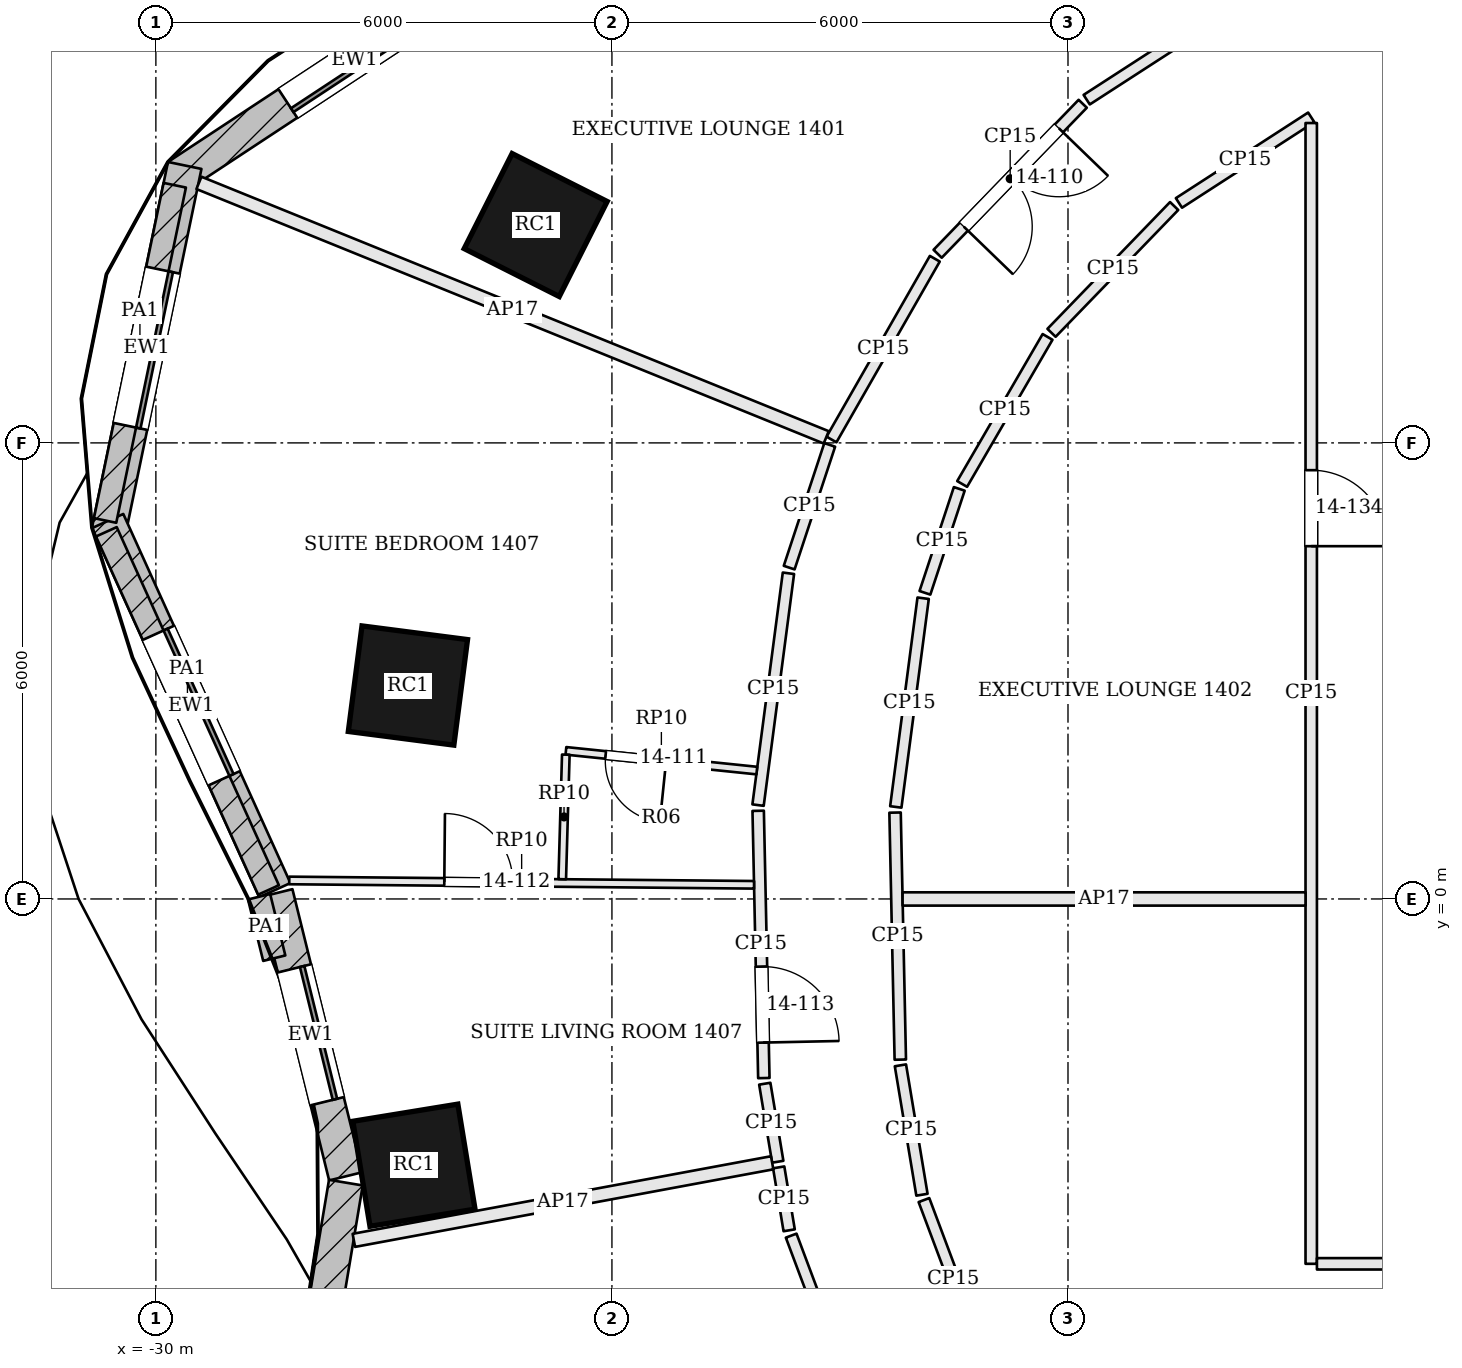
"""IFC4 building model, lengths in metres.
Left out: names, types, materials, properties, quantities, classifications, styles, units other than length and angle.
Written with IfcOpenShell. Run it as: python <this file> out.ifc"""

import sys

from ifc_helpers import new_model, si_unit, direction, frame, frame_2d, origin, origin_2d, place, context, subcontext, project, spatial, rectangle, extrude, element, fill, save


model = new_model("IFC4")
c1 = context("Model", 3, precision=1e-05, world=origin(), true_north=direction((0.0, 1.0)))
c2 = subcontext(c1, "Body", "Model", "MODEL_VIEW")
j1 = project(units=[si_unit("LENGTHUNIT", "METRE"), si_unit("PLANEANGLEUNIT", "RADIAN")], contexts=[c1])
p1 = place(None, origin())
s1 = spatial("IfcSite", under=j1, at=p1, CompositionType="ELEMENT")
p2 = place(p1, origin())
s2 = spatial("IfcBuilding", under=s1, at=p2, CompositionType="ELEMENT")
p3 = place(p2, frame((0.0, 0.0, 66.3)))
s3 = spatial("IfcBuildingStorey", under=s2, at=p3, CompositionType="ELEMENT", Elevation=66.3)
for number, where, z_axis, x_axis in (
    (1, (-25.003, 8.866, 0.0), (0.0, 0.0, 1.0), (-0.45, -0.893, 0.0)),
    (2, (-26.684, 2.808, 0.0), (0.0, 0.0, 1.0), (-0.128, -0.992, 0.0)),
    (3, (-26.605, -3.503, 0.0), (0.0, 0.0, 1.0), (0.161, -0.987, 0.0)),
):
    element("IfcColumn", number, at=place(p3, frame(where, z_axis=z_axis, x_axis=x_axis)), inside=s3, PredefinedType="COLUMN", context=c2, shape_type="SweptSolid", body=[
        extrude(rectangle(XDim=1.4, YDim=1.4, at=origin_2d()), origin(), (0.0, 0.0, 1.0), 3.6),
    ])
p4 = place(p3, frame((-25.061, 12.574, 0.0), z_axis=(0.0, 0.0, 1.0), x_axis=(-0.83520622102, -0.549936876714, 0.0)))
e4 = element("IfcWall", 4, at=p4, inside=s3, PredefinedType="SOLIDWALL", context=c2, shape_type="SweptSolid", body=[
    extrude(rectangle(XDim=5.57, YDim=0.45, at=frame_2d((2.785, 0.0))), origin(), (0.0, 0.0, 1.0), 3.4),
])
p5 = place(p4, frame((1.735, 0.0, 0.9)))
e5 = element("IfcOpeningElement", 5, at=p5, cuts=e4, PredefinedType="OPENING", context=c2, shape_type="SweptSolid", body=[
    extrude(rectangle(XDim=2.1, YDim=2.0, at=frame_2d((1.05, 1.0))), frame((0.0, 0.235, 0.0), z_axis=(0.0, -1.0, 0.0), x_axis=(1.0, 0.0, 0.0)), (0.0, 0.0, 1.0), 0.47),
])
p6 = place(p3, frame((-29.621, 9.65, 0.0), z_axis=(0.0, 0.0, 1.0), x_axis=(-0.203505836306, -0.979073732969, 0.0)))
e6 = element("IfcWall", 6, at=p6, inside=s3, PredefinedType="SOLIDWALL", context=c2, shape_type="SweptSolid", body=[
    extrude(rectangle(XDim=4.914, YDim=0.45, at=frame_2d((2.457, 0.0))), origin(), (0.0, 0.0, 1.0), 3.4),
])
p7 = place(p6, frame((1.407, 0.0, 0.9)))
e7 = element("IfcOpeningElement", 7, at=p7, cuts=e6, PredefinedType="OPENING", context=c2, shape_type="SweptSolid", body=[
    extrude(rectangle(XDim=2.1, YDim=2.0, at=frame_2d((1.05, 1.0))), frame((0.0, 0.235, 0.0), z_axis=(0.0, -1.0, 0.0), x_axis=(1.0, 0.0, 0.0)), (0.0, 0.0, 1.0), 0.47),
])
p8 = place(p3, frame((-30.634, 4.972, 0.0), z_axis=(0.0, 0.0, 1.0), x_axis=(0.412494644758, -0.910960025493, 0.0)))
e8 = element("IfcWall", 8, at=p8, inside=s3, PredefinedType="SOLIDWALL", context=c2, shape_type="SweptSolid", body=[
    extrude(rectangle(XDim=5.33, YDim=0.45, at=frame_2d((2.665, 0.0))), origin(), (0.0, 0.0, 1.0), 3.4),
])
p9 = place(p8, frame((1.615, 0.0, 0.9)))
e9 = element("IfcOpeningElement", 9, at=p9, cuts=e8, PredefinedType="OPENING", context=c2, shape_type="SweptSolid", body=[
    extrude(rectangle(XDim=2.1, YDim=2.0, at=frame_2d((1.05, 1.0))), frame((0.0, 0.235, 0.0), z_axis=(0.0, -1.0, 0.0), x_axis=(1.0, 0.0, 0.0)), (0.0, 0.0, 1.0), 0.47),
])
p10 = place(p3, frame((-28.422, 0.075, 0.0), z_axis=(0.0, 0.0, 1.0), x_axis=(0.239809222807, -0.970820033094, 0.0)))
e10 = element("IfcWall", 10, at=p10, inside=s3, PredefinedType="SOLIDWALL", context=c2, shape_type="SweptSolid", body=[
    extrude(rectangle(XDim=3.836, YDim=0.45, at=frame_2d((1.918, 0.0))), origin(), (0.0, 0.0, 1.0), 3.4),
])
p11 = place(p10, frame((1.018, 0.0, 0.9)))
e11 = element("IfcOpeningElement", 11, at=p11, cuts=e10, PredefinedType="OPENING", context=c2, shape_type="SweptSolid", body=[
    extrude(rectangle(XDim=1.8, YDim=2.0, at=frame_2d((0.9, 1.0))), frame((0.0, 0.235, 0.0), z_axis=(0.0, -1.0, 0.0), x_axis=(1.0, 0.0, 0.0)), (0.0, 0.0, 1.0), 0.47),
])
p12 = place(p3, frame((-27.5, -3.732, 0.0), z_axis=(0.0, 0.0, 1.0), x_axis=(-0.165174419367, -0.986264371853, 0.0)))
e12 = element("IfcWall", 12, at=p12, inside=s3, PredefinedType="SOLIDWALL", context=c2, shape_type="SweptSolid", body=[
    extrude(rectangle(XDim=5.769, YDim=0.45, at=frame_2d((2.885, 0.0))), origin(), (0.0, 0.0, 1.0), 3.4),
])
p13 = place(p12, frame((1.834, 0.0, 0.9)))
e13 = element("IfcOpeningElement", 13, at=p13, cuts=e12, PredefinedType="OPENING", context=c2, shape_type="SweptSolid", body=[
    extrude(rectangle(XDim=2.1, YDim=2.0, at=frame_2d((1.05, 1.0))), frame((0.0, 0.235, 0.0), z_axis=(0.0, -1.0, 0.0), x_axis=(1.0, 0.0, 0.0)), (0.0, 0.0, 1.0), 0.47),
])
p14 = place(p3, frame((-29.751, 9.39, 3.6), z_axis=(0.0, 0.0, 1.0), x_axis=(-0.203510555438, -0.97907275206, 0.0)))
e14 = element("IfcWall", 14, at=p14, inside=s3, PredefinedType="PARAPET", context=c2, shape_type="SweptSolid", body=[
    extrude(rectangle(XDim=4.505, YDim=0.3, at=frame_2d((2.252, 0.0))), origin(), (0.0, 0.0, 1.0), 1.1),
])
p15 = place(p3, frame((-30.652, 4.83, 3.6), z_axis=(0.0, 0.0, 1.0), x_axis=(0.412522333553, -0.910947487136, 0.0)))
e15 = element("IfcWall", 15, at=p15, inside=s3, PredefinedType="PARAPET", context=c2, shape_type="SweptSolid", body=[
    extrude(rectangle(XDim=5.173, YDim=0.3, at=frame_2d((2.586, 0.0))), origin(), (0.0, 0.0, 1.0), 1.1),
])
p16 = place(p3, frame((-28.642, 0.029, 3.6), z_axis=(0.0, 0.0, 1.0), x_axis=(0.239775825721, -0.970828282138, 0.0)))
e16 = element("IfcWall", 16, at=p16, inside=s3, PredefinedType="PARAPET", context=c2, shape_type="SweptSolid", body=[
    extrude(rectangle(XDim=0.833, YDim=0.3, at=frame_2d((0.417, 0.0))), origin(), (0.0, 0.0, 1.0), 1.1),
])
p17 = place(p3, frame((-15.166, 12.19, 0.0), z_axis=(0.0, 0.0, 1.0), x_axis=(-0.839538287855, -0.54330052754, 0.0)))
e17 = element("IfcWall", 17, at=p17, inside=s3, PredefinedType="PARTITIONING", context=c2, shape_type="SweptSolid", body=[
    extrude(rectangle(XDim=3.083, YDim=0.15, at=frame_2d((1.542, 0.0))), origin(), (0.0, 0.0, 1.0), 2.68),
])
p18 = place(p3, frame((-17.806, 10.462, 0.0), z_axis=(0.0, 0.0, 1.0), x_axis=(-0.695227375123, -0.71878988368, 0.0)))
e18 = element("IfcWall", 18, at=p18, inside=s3, PredefinedType="PARTITIONING", context=c2, shape_type="SweptSolid", body=[
    extrude(rectangle(XDim=2.746, YDim=0.15, at=frame_2d((1.373, 0.0))), origin(), (0.0, 0.0, 1.0), 2.68),
])
p19 = place(p18, frame((0.45, 0.0, 0.0)))
e19 = element("IfcOpeningElement", 19, at=p19, cuts=e18, PredefinedType="OPENING", context=c2, shape_type="SweptSolid", body=[
    extrude(rectangle(XDim=1.8, YDim=2.1, at=frame_2d((0.9, 1.05))), frame((0.0, 0.085, 0.0), z_axis=(0.0, -1.0, 0.0), x_axis=(1.0, 0.0, 0.0)), (0.0, 0.0, 1.0), 0.17),
])
p20 = place(p3, frame((-19.752, 8.423, 0.0), z_axis=(0.0, 0.0, 1.0), x_axis=(-0.496186930697, -0.86821571617, 0.0)))
e20 = element("IfcWall", 20, at=p20, inside=s3, PredefinedType="PARTITIONING", context=c2, shape_type="SweptSolid", body=[
    extrude(rectangle(XDim=2.739, YDim=0.15, at=frame_2d((1.37, 0.0))), origin(), (0.0, 0.0, 1.0), 2.68),
])
p21 = place(p3, frame((-29.434, 9.421, 0.0), z_axis=(0.0, 0.0, 1.0), x_axis=(0.92666211568, -0.375895362252, 0.0)))
e21 = element("IfcWall", 21, at=p21, inside=s3, PredefinedType="PARTITIONING", context=c2, shape_type="SweptSolid", body=[
    extrude(rectangle(XDim=8.906, YDim=0.175, at=frame_2d((4.453, 0.0))), origin(), (0.0, 0.0, 1.0), 2.68),
])
p22 = place(p3, frame((-21.135, 5.973, 0.0), z_axis=(0.0, 0.0, 1.0), x_axis=(-0.313641633586, -0.949541429155, 0.0)))
e22 = element("IfcWall", 22, at=p22, inside=s3, PredefinedType="PARTITIONING", context=c2, shape_type="SweptSolid", body=[
    extrude(rectangle(XDim=1.7, YDim=0.15, at=frame_2d((0.85, 0.0))), origin(), (0.0, 0.0, 1.0), 2.68),
])
p23 = place(p3, frame((-21.678, 4.285, 0.0), z_axis=(0.0, 0.0, 1.0), x_axis=(-0.129922755307, -0.991524118543, 0.0)))
e23 = element("IfcWall", 23, at=p23, inside=s3, PredefinedType="PARTITIONING", context=c2, shape_type="SweptSolid", body=[
    extrude(rectangle(XDim=3.076, YDim=0.15, at=frame_2d((1.538, 0.0))), origin(), (0.0, 0.0, 1.0), 2.68),
])
p24 = place(p3, frame((-22.076, 1.16, 0.0), z_axis=(0.0, 0.0, 1.0), x_axis=(0.021172866829, -0.999775829729, 0.0)))
e24 = element("IfcWall", 24, at=p24, inside=s3, PredefinedType="PARTITIONING", context=c2, shape_type="SweptSolid", body=[
    extrude(rectangle(XDim=3.517, YDim=0.15, at=frame_2d((1.758, 0.0))), origin(), (0.0, 0.0, 1.0), 2.68),
])
p25 = place(p24, frame((2.05, 0.0, 0.0)))
e25 = element("IfcOpeningElement", 25, at=p25, cuts=e24, PredefinedType="OPENING", context=c2, shape_type="SweptSolid", body=[
    extrude(rectangle(XDim=1.0, YDim=2.1, at=frame_2d((0.5, 1.05))), frame((0.0, 0.085, 0.0), z_axis=(0.0, -1.0, 0.0), x_axis=(1.0, 0.0, 0.0)), (0.0, 0.0, 1.0), 0.17),
])
p26 = place(p3, frame((-21.989, -2.43, 0.0), z_axis=(0.0, 0.0, 1.0), x_axis=(0.164170791844, -0.986431929281, 0.0)))
e26 = element("IfcWall", 26, at=p26, inside=s3, PredefinedType="PARTITIONING", context=c2, shape_type="SweptSolid", body=[
    extrude(rectangle(XDim=1.041, YDim=0.15, at=frame_2d((0.521, 0.0))), origin(), (0.0, 0.0, 1.0), 2.68),
])
p27 = place(p3, frame((-27.396, -4.491, 0.0), z_axis=(0.0, 0.0, 1.0), x_axis=(0.983238590395, 0.182323543069, 0.0)))
e27 = element("IfcWall", 27, at=p27, inside=s3, PredefinedType="PARTITIONING", context=c2, shape_type="SweptSolid", body=[
    extrude(rectangle(XDim=5.597, YDim=0.175, at=frame_2d((2.799, 0.0))), origin(), (0.0, 0.0, 1.0), 2.68),
])
p28 = place(p3, frame((-21.806, -3.531, 0.0), z_axis=(0.0, 0.0, 1.0), x_axis=(0.164068764938, -0.986448904086, 0.0)))
e28 = element("IfcWall", 28, at=p28, inside=s3, PredefinedType="PARTITIONING", context=c2, shape_type="SweptSolid", body=[
    extrude(rectangle(XDim=0.839, YDim=0.15, at=frame_2d((0.42, 0.0))), origin(), (0.0, 0.0, 1.0), 2.68),
])
p29 = place(p3, frame((-21.642, -4.429, 0.0), z_axis=(0.0, 0.0, 1.0), x_axis=(0.350963719781, -0.936389057709, 0.0)))
e29 = element("IfcWall", 29, at=p29, inside=s3, PredefinedType="PARTITIONING", context=c2, shape_type="SweptSolid", body=[
    extrude(rectangle(XDim=2.68, YDim=0.15, at=frame_2d((1.34, 0.0))), origin(), (0.0, 0.0, 1.0), 2.68),
])
p30 = place(p3, frame((-19.921, -3.891, 0.0), z_axis=(0.0, 0.0, 1.0), x_axis=(-0.164100753818, 0.986443583078, 0.0)))
e30 = element("IfcWall", 30, at=p30, inside=s3, PredefinedType="PARTITIONING", context=c2, shape_type="SweptSolid", body=[
    extrude(rectangle(XDim=1.726, YDim=0.15, at=frame_2d((0.863, 0.0))), origin(), (0.0, 0.0, 1.0), 2.68),
])
p31 = place(p3, frame((-20.206, -2.114, 0.0), z_axis=(0.0, 0.0, 1.0), x_axis=(-0.021179142616, 0.999775696803, 0.0)))
e31 = element("IfcWall", 31, at=p31, inside=s3, PredefinedType="PARTITIONING", context=c2, shape_type="SweptSolid", body=[
    extrude(rectangle(XDim=3.251, YDim=0.15, at=frame_2d((1.625, 0.0))), origin(), (0.0, 0.0, 1.0), 2.68),
])
p32 = place(p3, frame((-20.265, 1.211, 0.0), z_axis=(0.0, 0.0, 1.0), x_axis=(0.129957307165, 0.991519590484, 0.0)))
e32 = element("IfcWall", 32, at=p32, inside=s3, PredefinedType="PARTITIONING", context=c2, shape_type="SweptSolid", body=[
    extrude(rectangle(XDim=2.769, YDim=0.15, at=frame_2d((1.385, 0.0))), origin(), (0.0, 0.0, 1.0), 2.68),
])
p33 = place(p3, frame((-19.882, 4.028, 0.0), z_axis=(0.0, 0.0, 1.0), x_axis=(0.313632756375, 0.949544361327, 0.0)))
e33 = element("IfcWall", 33, at=p33, inside=s3, PredefinedType="PARTITIONING", context=c2, shape_type="SweptSolid", body=[
    extrude(rectangle(XDim=1.44, YDim=0.15, at=frame_2d((0.72, 0.0))), origin(), (0.0, 0.0, 1.0), 2.68),
])
p34 = place(p3, frame((-19.393, 5.46, 0.0), z_axis=(0.0, 0.0, 1.0), x_axis=(0.502296094562, 0.864695688314, 0.0)))
e34 = element("IfcWall", 34, at=p34, inside=s3, PredefinedType="PARTITIONING", context=c2, shape_type="SweptSolid", body=[
    extrude(rectangle(XDim=2.237, YDim=0.15, at=frame_2d((1.119, 0.0))), origin(), (0.0, 0.0, 1.0), 2.68),
])
p35 = place(p3, frame((-18.217, 7.448, 0.0), z_axis=(0.0, 0.0, 1.0), x_axis=(0.695172542355, 0.718842914938, 0.0)))
e35 = element("IfcWall", 35, at=p35, inside=s3, PredefinedType="PARTITIONING", context=c2, shape_type="SweptSolid", body=[
    extrude(rectangle(XDim=2.321, YDim=0.15, at=frame_2d((1.16, 0.0))), origin(), (0.0, 0.0, 1.0), 2.68),
])
p36 = place(p3, frame((-16.54, 9.157, 0.0), z_axis=(0.0, 0.0, 1.0), x_axis=(0.839529075717, 0.543314762385, 0.0)))
e36 = element("IfcWall", 36, at=p36, inside=s3, PredefinedType="PARTITIONING", context=c2, shape_type="SweptSolid", body=[
    extrude(rectangle(XDim=2.073, YDim=0.15, at=frame_2d((1.036, 0.0))), origin(), (0.0, 0.0, 1.0), 2.68),
])
p37 = place(p3, frame((-14.8, 10.208, 0.0), z_axis=(0.0, 0.0, 1.0), x_axis=(0.0, -1.0, 0.0)))
e37 = element("IfcWall", 37, at=p37, inside=s3, PredefinedType="PARTITIONING", context=c2, shape_type="SweptSolid", body=[
    extrude(rectangle(XDim=15.008, YDim=0.15, at=frame_2d((7.504, 0.0))), origin(), (0.0, 0.0, 1.0), 2.68),
])
p38 = place(p37, frame((4.567, 0.0, 0.0)))
e38 = element("IfcOpeningElement", 38, at=p38, cuts=e37, PredefinedType="OPENING", context=c2, shape_type="SweptSolid", body=[
    extrude(rectangle(XDim=1.0, YDim=2.1, at=frame_2d((0.5, 1.05))), frame((0.0, 0.085, 0.0), z_axis=(0.0, -1.0, 0.0), x_axis=(1.0, 0.0, 0.0)), (0.0, 0.0, 1.0), 0.17),
])
p39 = place(p3, frame((-14.725, -4.8, 0.0), z_axis=(0.0, 0.0, 1.0), x_axis=(1.0, 0.0, 0.0)))
e39 = element("IfcWall", 39, at=p39, inside=s3, PredefinedType="PARTITIONING", context=c2, shape_type="SweptSolid", body=[
    extrude(rectangle(XDim=29.525, YDim=0.15, at=frame_2d((14.763, 0.0))), origin(), (0.0, 0.0, 1.0), 2.68),
])
p40 = place(p39, frame((3.425, 0.0, 0.0)))
e40 = element("IfcOpeningElement", 40, at=p40, cuts=e39, PredefinedType="OPENING", context=c2, shape_type="SweptSolid", body=[
    extrude(rectangle(XDim=1.8, YDim=2.1, at=frame_2d((0.9, 1.05))), frame((0.0, 0.085, 0.0), z_axis=(0.0, -1.0, 0.0), x_axis=(1.0, 0.0, 0.0)), (0.0, 0.0, 1.0), 0.17),
])
p41 = place(p39, frame((13.825, 0.0, 0.0)))
e41 = element("IfcOpeningElement", 41, at=p41, cuts=e39, PredefinedType="OPENING", context=c2, shape_type="SweptSolid", body=[
    extrude(rectangle(XDim=1.8, YDim=2.1, at=frame_2d((0.9, 1.05))), frame((0.0, 0.085, 0.0), z_axis=(0.0, -1.0, 0.0), x_axis=(1.0, 0.0, 0.0)), (0.0, 0.0, 1.0), 0.17),
])
p42 = place(p39, frame((24.225, 0.0, 0.0)))
e42 = element("IfcOpeningElement", 42, at=p42, cuts=e39, PredefinedType="OPENING", context=c2, shape_type="SweptSolid", body=[
    extrude(rectangle(XDim=1.8, YDim=2.1, at=frame_2d((0.9, 1.05))), frame((0.0, 0.085, 0.0), z_axis=(0.0, -1.0, 0.0), x_axis=(1.0, 0.0, 0.0)), (0.0, 0.0, 1.0), 0.17),
])
p43 = place(p3, frame((-19.121, -6.026, 0.0), z_axis=(0.0, 0.0, 1.0), x_axis=(-0.351026357955, 0.936365578191, 0.0)))
e43 = element("IfcWall", 43, at=p43, inside=s3, PredefinedType="PARTITIONING", context=c2, shape_type="SweptSolid", body=[
    extrude(rectangle(XDim=2.205, YDim=0.15, at=frame_2d((1.103, 0.0))), origin(), (0.0, 0.0, 1.0), 2.68),
])
p44 = place(p3, frame((-28.245, 0.243, 0.0), z_axis=(0.0, 0.0, 1.0), x_axis=(0.999955988555, -0.00938194823, 0.0)))
e44 = element("IfcWall", 44, at=p44, inside=s3, PredefinedType="PARTITIONING", context=c2, shape_type="SweptSolid", body=[
    extrude(rectangle(XDim=6.115, YDim=0.1, at=frame_2d((3.058, 0.0))), origin(), (0.0, 0.0, 1.0), 2.68),
])
p45 = place(p44, frame((2.04, 0.0, 0.0)))
e45 = element("IfcOpeningElement", 45, at=p45, cuts=e44, PredefinedType="OPENING", context=c2, shape_type="SweptSolid", body=[
    extrude(rectangle(XDim=0.9, YDim=2.4, at=frame_2d((0.45, 1.2))), frame((0.0, 0.06, 0.0), z_axis=(0.0, -1.0, 0.0), x_axis=(1.0, 0.0, 0.0)), (0.0, 0.0, 1.0), 0.12),
])
p46 = place(p3, frame((-22.094, 1.689, 0.0), z_axis=(0.0, 0.0, 1.0), x_axis=(-0.994703390925, 0.102786984014, 0.0)))
e46 = element("IfcWall", 46, at=p46, inside=s3, PredefinedType="PARTITIONING", context=c2, shape_type="SweptSolid", body=[
    extrude(rectangle(XDim=2.525, YDim=0.1, at=frame_2d((1.262, 0.0))), origin(), (0.0, 0.0, 1.0), 2.68),
])
p47 = place(p46, frame((1.2, 0.0, 0.0)))
e47 = element("IfcOpeningElement", 47, at=p47, cuts=e46, PredefinedType="OPENING", context=c2, shape_type="SweptSolid", body=[
    extrude(rectangle(XDim=0.8, YDim=2.1, at=frame_2d((0.4, 1.05))), frame((0.0, 0.06, 0.0), z_axis=(0.0, -1.0, 0.0), x_axis=(1.0, 0.0, 0.0)), (0.0, 0.0, 1.0), 0.12),
])
p48 = place(p3, frame((-24.607, 1.898, 0.0), z_axis=(0.0, 0.0, 1.0), x_axis=(-0.028742589595, -0.999586846424, 0.0)))
e48 = element("IfcWall", 48, at=p48, inside=s3, PredefinedType="PARTITIONING", context=c2, shape_type="SweptSolid", body=[
    extrude(rectangle(XDim=1.639, YDim=0.1, at=frame_2d((0.82, 0.0))), origin(), (0.0, 0.0, 1.0), 2.68),
])
p49 = place(p3, frame((-20.176, 0.0, 0.0), z_axis=(0.0, 0.0, 1.0), x_axis=(1.0, 0.0, 0.0)))
e49 = element("IfcWall", 49, at=p49, inside=s3, PredefinedType="PARTITIONING", context=c2, shape_type="SweptSolid", body=[
    extrude(rectangle(XDim=5.301, YDim=0.175, at=frame_2d((2.65, 0.0))), origin(), (0.0, 0.0, 1.0), 2.68),
])
p50 = place(p5, origin())
e50 = element("IfcWindow", 50, at=p50, inside=s3, PartitioningType="SINGLE_PANEL", PredefinedType="WINDOW", context=c2, shape_type="SweptSolid", body=[
    extrude(rectangle(XDim=2.1, YDim=2.0, at=frame_2d((1.05, 1.0))), frame((0.0, 0.135, 0.0), z_axis=(0.0, -1.0, 0.0), x_axis=(1.0, 0.0, 0.0)), (0.0, 0.0, 1.0), 0.06),
])
fill(e5, e50)
p51 = place(p7, origin())
e51 = element("IfcWindow", 51, at=p51, inside=s3, PartitioningType="SINGLE_PANEL", PredefinedType="WINDOW", context=c2, shape_type="SweptSolid", body=[
    extrude(rectangle(XDim=2.1, YDim=2.0, at=frame_2d((1.05, 1.0))), frame((0.0, 0.135, 0.0), z_axis=(0.0, -1.0, 0.0), x_axis=(1.0, 0.0, 0.0)), (0.0, 0.0, 1.0), 0.06),
])
fill(e7, e51)
p52 = place(p9, origin())
e52 = element("IfcWindow", 52, at=p52, inside=s3, PartitioningType="SINGLE_PANEL", PredefinedType="WINDOW", context=c2, shape_type="SweptSolid", body=[
    extrude(rectangle(XDim=2.1, YDim=2.0, at=frame_2d((1.05, 1.0))), frame((0.0, 0.135, 0.0), z_axis=(0.0, -1.0, 0.0), x_axis=(1.0, 0.0, 0.0)), (0.0, 0.0, 1.0), 0.06),
])
fill(e9, e52)
p53 = place(p11, origin())
e53 = element("IfcWindow", 53, at=p53, inside=s3, PartitioningType="SINGLE_PANEL", PredefinedType="WINDOW", context=c2, shape_type="SweptSolid", body=[
    extrude(rectangle(XDim=1.8, YDim=2.0, at=frame_2d((0.9, 1.0))), frame((0.0, 0.135, 0.0), z_axis=(0.0, -1.0, 0.0), x_axis=(1.0, 0.0, 0.0)), (0.0, 0.0, 1.0), 0.06),
])
fill(e11, e53)
p54 = place(p19, origin())
e54 = element("IfcDoor", 54, at=p54, inside=s3, OperationType="DOUBLE_DOOR_SINGLE_SWING", PredefinedType="DOOR", context=c2, shape_type="SweptSolid", body=[
    extrude(rectangle(XDim=1.8, YDim=2.1, at=frame_2d((0.9, 1.05))), frame((0.0, 0.025, 0.0), z_axis=(0.0, -1.0, 0.0), x_axis=(1.0, 0.0, 0.0)), (0.0, 0.0, 1.0), 0.05),
])
fill(e19, e54)
p55 = place(p47, origin())
e55 = element("IfcDoor", 55, at=p55, inside=s3, OperationType="SINGLE_SWING_LEFT", PredefinedType="DOOR", context=c2, shape_type="SweptSolid", body=[
    extrude(rectangle(XDim=0.8, YDim=2.1, at=frame_2d((0.4, 1.05))), frame((0.0, 0.025, 0.0), z_axis=(0.0, -1.0, 0.0), x_axis=(1.0, 0.0, 0.0)), (0.0, 0.0, 1.0), 0.05),
])
fill(e47, e55)
p56 = place(p45, origin())
e56 = element("IfcDoor", 56, at=p56, inside=s3, OperationType="SINGLE_SWING_LEFT", PredefinedType="DOOR", context=c2, shape_type="SweptSolid", body=[
    extrude(rectangle(XDim=0.9, YDim=2.4, at=frame_2d((0.45, 1.2))), frame((0.0, 0.025, 0.0), z_axis=(0.0, -1.0, 0.0), x_axis=(1.0, 0.0, 0.0)), (0.0, 0.0, 1.0), 0.05),
])
fill(e45, e56)
p57 = place(p25, origin())
e57 = element("IfcDoor", 57, at=p57, inside=s3, OperationType="SINGLE_SWING_RIGHT", PredefinedType="DOOR", context=c2, shape_type="SweptSolid", body=[
    extrude(rectangle(XDim=1.0, YDim=2.1, at=frame_2d((0.5, 1.05))), frame((0.0, 0.025, 0.0), z_axis=(0.0, -1.0, 0.0), x_axis=(1.0, 0.0, 0.0)), (0.0, 0.0, 1.0), 0.05),
])
fill(e25, e57)
p58 = place(p38, origin())
e58 = element("IfcDoor", 58, at=p58, inside=s3, OperationType="SINGLE_SWING_RIGHT", PredefinedType="DOOR", context=c2, shape_type="SweptSolid", body=[
    extrude(rectangle(XDim=1.0, YDim=2.1, at=frame_2d((0.5, 1.05))), frame((0.0, 0.025, 0.0), z_axis=(0.0, -1.0, 0.0), x_axis=(1.0, 0.0, 0.0)), (0.0, 0.0, 1.0), 0.05),
])
fill(e38, e58)
save(model, sys.argv[1])
